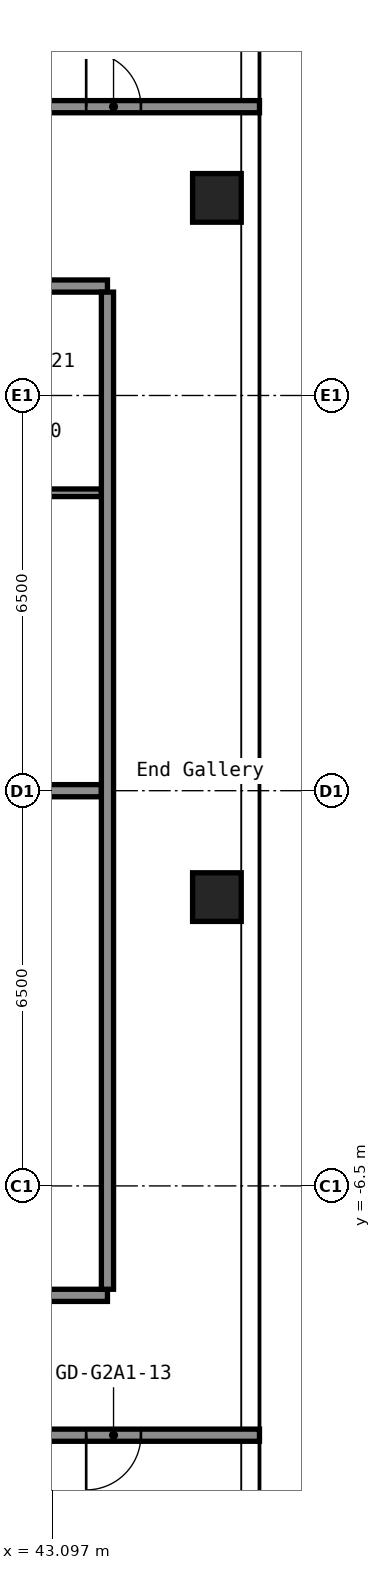
"""IFC4 building model, lengths in metres.
Left out: names, types, materials, properties, quantities, classifications, styles, units other than length and angle.
Written with IfcOpenShell. Run it as: python <this file> out.ifc"""

import sys

from ifc_helpers import new_model, si_unit, direction, frame, frame_2d, origin, origin_2d, place, context, subcontext, project, spatial, rectangle, hollow_rectangle, extrude, element, fill, save


model = new_model("IFC4")
c1 = context("Model", 3, precision=1e-05, world=origin(), true_north=direction((0.0, 1.0)))
c2 = subcontext(c1, "Body", "Model", "MODEL_VIEW")
j1 = project(units=[si_unit("LENGTHUNIT", "METRE"), si_unit("PLANEANGLEUNIT", "RADIAN")], contexts=[c1])
p1 = place(None, origin())
s1 = spatial("IfcSite", under=j1, at=p1, CompositionType="ELEMENT")
p2 = place(p1, origin())
s2 = spatial("IfcBuilding", under=s1, at=p2, CompositionType="ELEMENT")
p3 = place(p2, frame((0.0, 0.0, 91.4)))
s3 = spatial("IfcBuildingStorey", under=s2, at=p3, CompositionType="ELEMENT", Elevation=91.4)
for number, where, z_axis, x_axis in (
    (1, (45.8, -1.75, 0.0), (0.0, 0.0, 1.0), (1.0, 0.0, 0.0)),
    (2, (45.8, 9.75, 0.0), (0.0, 0.0, 1.0), (1.0, 0.0, 0.0)),
):
    element("IfcColumn", number, at=place(p3, frame(where, z_axis=z_axis, x_axis=x_axis)), inside=s3, PredefinedType="COLUMN", context=c2, shape_type="SweptSolid", body=[
        extrude(hollow_rectangle(XDim=0.8, YDim=0.8, WallThickness=0.032, at=origin_2d()), origin(), (0.0, 0.0, 1.0), 2.8),
    ])
p4 = place(p3, frame((16.8, -10.6, 0.0), z_axis=(0.0, 0.0, 1.0), x_axis=(1.0, 0.0, 0.0)))
e3 = element("IfcWall", 3, at=p4, inside=s3, PredefinedType="PARTITIONING", context=c2, shape_type="SweptSolid", body=[
    extrude(rectangle(XDim=29.7, YDim=0.2, at=frame_2d((14.85, 0.0))), origin(), (0.0, 0.0, 1.0), 2.8),
])
p5 = place(p4, frame((1.06, 0.0, 0.0)))
e4 = element("IfcOpeningElement", 4, at=p5, cuts=e3, PredefinedType="OPENING", context=c2, shape_type="SweptSolid", body=[
    extrude(rectangle(XDim=0.9, YDim=2.1, at=frame_2d((0.45, 1.05))), frame((0.0, 0.11, 0.0), z_axis=(0.0, -1.0, 0.0), x_axis=(1.0, 0.0, 0.0)), (0.0, 0.0, 1.0), 0.22),
])
p6 = place(p4, frame((5.26, 0.0, 0.0)))
e5 = element("IfcOpeningElement", 5, at=p6, cuts=e3, PredefinedType="OPENING", context=c2, shape_type="SweptSolid", body=[
    extrude(rectangle(XDim=0.9, YDim=2.1, at=frame_2d((0.45, 1.05))), frame((0.0, 0.11, 0.0), z_axis=(0.0, -1.0, 0.0), x_axis=(1.0, 0.0, 0.0)), (0.0, 0.0, 1.0), 0.22),
])
p7 = place(p4, frame((9.63, 0.0, 0.0)))
e6 = element("IfcOpeningElement", 6, at=p7, cuts=e3, PredefinedType="OPENING", context=c2, shape_type="SweptSolid", body=[
    extrude(rectangle(XDim=0.9, YDim=2.1, at=frame_2d((0.45, 1.05))), frame((0.0, 0.11, 0.0), z_axis=(0.0, -1.0, 0.0), x_axis=(1.0, 0.0, 0.0)), (0.0, 0.0, 1.0), 0.22),
])
p8 = place(p4, frame((13.83, 0.0, 0.0)))
e7 = element("IfcOpeningElement", 7, at=p8, cuts=e3, PredefinedType="OPENING", context=c2, shape_type="SweptSolid", body=[
    extrude(rectangle(XDim=0.9, YDim=2.1, at=frame_2d((0.45, 1.05))), frame((0.0, 0.11, 0.0), z_axis=(0.0, -1.0, 0.0), x_axis=(1.0, 0.0, 0.0)), (0.0, 0.0, 1.0), 0.22),
])
p9 = place(p4, frame((18.115, 0.0, 0.0)))
e8 = element("IfcOpeningElement", 8, at=p9, cuts=e3, PredefinedType="OPENING", context=c2, shape_type="SweptSolid", body=[
    extrude(rectangle(XDim=0.9, YDim=2.1, at=frame_2d((0.45, 1.05))), frame((0.0, 0.11, 0.0), z_axis=(0.0, -1.0, 0.0), x_axis=(1.0, 0.0, 0.0)), (0.0, 0.0, 1.0), 0.22),
])
p10 = place(p4, frame((22.315, 0.0, 0.0)))
e9 = element("IfcOpeningElement", 9, at=p10, cuts=e3, PredefinedType="OPENING", context=c2, shape_type="SweptSolid", body=[
    extrude(rectangle(XDim=0.9, YDim=2.1, at=frame_2d((0.45, 1.05))), frame((0.0, 0.11, 0.0), z_axis=(0.0, -1.0, 0.0), x_axis=(1.0, 0.0, 0.0)), (0.0, 0.0, 1.0), 0.22),
])
p11 = place(p4, frame((26.85, 0.0, 0.0)))
e10 = element("IfcOpeningElement", 10, at=p11, cuts=e3, PredefinedType="OPENING", context=c2, shape_type="SweptSolid", body=[
    extrude(rectangle(XDim=0.9, YDim=2.1, at=frame_2d((0.45, 1.05))), frame((0.0, 0.11, 0.0), z_axis=(0.0, -1.0, 0.0), x_axis=(1.0, 0.0, 0.0)), (0.0, 0.0, 1.0), 0.22),
])
p12 = place(p3, frame((33.6, -8.3, 0.0), z_axis=(0.0, 0.0, 1.0), x_axis=(1.0, 0.0, 0.0)))
e11 = element("IfcWall", 11, at=p12, inside=s3, PredefinedType="PARTITIONING", context=c2, shape_type="SweptSolid", body=[
    extrude(rectangle(XDim=10.4, YDim=0.2, at=frame_2d((5.2, 0.0))), origin(), (0.0, 0.0, 1.0), 2.8),
])
p13 = place(p12, frame((4.7, 0.0, 0.0)))
e12 = element("IfcOpeningElement", 12, at=p13, cuts=e11, PredefinedType="OPENING", context=c2, shape_type="SweptSolid", body=[
    extrude(rectangle(XDim=1.0, YDim=2.1, at=frame_2d((0.5, 1.05))), frame((0.0, 0.11, 0.0), z_axis=(0.0, -1.0, 0.0), x_axis=(1.0, 0.0, 0.0)), (0.0, 0.0, 1.0), 0.22),
])
p14 = place(p3, frame((33.6, 0.0, 0.0), z_axis=(0.0, 0.0, 1.0), x_axis=(1.0, 0.0, 0.0)))
e13 = element("IfcWall", 13, at=p14, inside=s3, PredefinedType="PARTITIONING", context=c2, shape_type="SweptSolid", body=[
    extrude(rectangle(XDim=10.3, YDim=0.2, at=frame_2d((5.15, 0.0))), origin(), (0.0, 0.0, 1.0), 2.8),
])
p15 = place(p3, frame((40.663, 4.9, 0.0), z_axis=(0.0, 0.0, 1.0), x_axis=(1.0, 0.0, 0.0)))
e14 = element("IfcWall", 14, at=p15, inside=s3, PredefinedType="PARTITIONING", context=c2, shape_type="SweptSolid", body=[
    extrude(rectangle(XDim=3.237, YDim=0.125, at=frame_2d((1.619, 0.0))), origin(), (0.0, 0.0, 1.0), 2.8),
])
p16 = place(p15, frame((1.238, 0.0, 0.0)))
e15 = element("IfcOpeningElement", 15, at=p16, cuts=e14, PredefinedType="OPENING", context=c2, shape_type="SweptSolid", body=[
    extrude(rectangle(XDim=0.8, YDim=2.1, at=frame_2d((0.4, 1.05))), frame((0.0, 0.073, 0.0), z_axis=(0.0, -1.0, 0.0), x_axis=(1.0, 0.0, 0.0)), (0.0, 0.0, 1.0), 0.145),
])
p17 = place(p3, frame((33.6, 8.3, 0.0), z_axis=(0.0, 0.0, 1.0), x_axis=(1.0, 0.0, 0.0)))
e16 = element("IfcWall", 16, at=p17, inside=s3, PredefinedType="PARTITIONING", context=c2, shape_type="SweptSolid", body=[
    extrude(rectangle(XDim=10.4, YDim=0.2, at=frame_2d((5.2, 0.0))), origin(), (0.0, 0.0, 1.0), 2.8),
])
p18 = place(p17, frame((3.05, 0.0, 0.0)))
e17 = element("IfcOpeningElement", 17, at=p18, cuts=e16, PredefinedType="OPENING", context=c2, shape_type="SweptSolid", body=[
    extrude(rectangle(XDim=1.0, YDim=2.1, at=frame_2d((0.5, 1.05))), frame((0.0, 0.11, 0.0), z_axis=(0.0, -1.0, 0.0), x_axis=(1.0, 0.0, 0.0)), (0.0, 0.0, 1.0), 0.22),
])
p19 = place(p3, frame((16.8, 11.25, 0.0), z_axis=(0.0, 0.0, 1.0), x_axis=(1.0, 0.0, 0.0)))
e18 = element("IfcWall", 18, at=p19, inside=s3, PredefinedType="PARTITIONING", context=c2, shape_type="SweptSolid", body=[
    extrude(rectangle(XDim=29.7, YDim=0.2, at=frame_2d((14.85, 0.0))), origin(), (0.0, 0.0, 1.0), 2.8),
])
p20 = place(p19, frame((2.0, 0.0, 0.0)))
e19 = element("IfcOpeningElement", 19, at=p20, cuts=e18, PredefinedType="OPENING", context=c2, shape_type="SweptSolid", body=[
    extrude(rectangle(XDim=1.0, YDim=2.1, at=frame_2d((0.5, 1.05))), frame((0.0, 0.11, 0.0), z_axis=(0.0, -1.0, 0.0), x_axis=(1.0, 0.0, 0.0)), (0.0, 0.0, 1.0), 0.22),
])
p21 = place(p19, frame((10.4, 0.0, 0.0)))
e20 = element("IfcOpeningElement", 20, at=p21, cuts=e18, PredefinedType="OPENING", context=c2, shape_type="SweptSolid", body=[
    extrude(rectangle(XDim=1.0, YDim=2.1, at=frame_2d((0.5, 1.05))), frame((0.0, 0.11, 0.0), z_axis=(0.0, -1.0, 0.0), x_axis=(1.0, 0.0, 0.0)), (0.0, 0.0, 1.0), 0.22),
])
p22 = place(p19, frame((18.8, 0.0, 0.0)))
e21 = element("IfcOpeningElement", 21, at=p22, cuts=e18, PredefinedType="OPENING", context=c2, shape_type="SweptSolid", body=[
    extrude(rectangle(XDim=1.0, YDim=2.1, at=frame_2d((0.5, 1.05))), frame((0.0, 0.11, 0.0), z_axis=(0.0, -1.0, 0.0), x_axis=(1.0, 0.0, 0.0)), (0.0, 0.0, 1.0), 0.22),
])
p23 = place(p19, frame((26.85, 0.0, 0.0)))
e22 = element("IfcOpeningElement", 22, at=p23, cuts=e18, PredefinedType="OPENING", context=c2, shape_type="SweptSolid", body=[
    extrude(rectangle(XDim=0.9, YDim=2.1, at=frame_2d((0.45, 1.05))), frame((0.0, 0.11, 0.0), z_axis=(0.0, -1.0, 0.0), x_axis=(1.0, 0.0, 0.0)), (0.0, 0.0, 1.0), 0.22),
])
p24 = place(p3, frame((44.0, -8.2, 0.0), z_axis=(0.0, 0.0, 1.0), x_axis=(0.0, 1.0, 0.0)))
e23 = element("IfcWall", 23, at=p24, inside=s3, PredefinedType="PARTITIONING", context=c2, shape_type="SweptSolid", body=[
    extrude(rectangle(XDim=16.4, YDim=0.2, at=frame_2d((8.2, 0.0))), origin(), (0.0, 0.0, 1.0), 2.8),
])
p25 = place(p11, origin())
e24 = element("IfcDoor", 24, at=p25, inside=s3, OperationType="SINGLE_SWING_LEFT", PredefinedType="DOOR", context=c2, shape_type="SweptSolid", body=[
    extrude(rectangle(XDim=0.9, YDim=2.1, at=frame_2d((0.45, 1.05))), frame((0.0, 0.025, 0.0), z_axis=(0.0, -1.0, 0.0), x_axis=(1.0, 0.0, 0.0)), (0.0, 0.0, 1.0), 0.05),
])
fill(e10, e24)
p26 = place(p23, origin())
e25 = element("IfcDoor", 25, at=p26, inside=s3, OperationType="SINGLE_SWING_RIGHT", PredefinedType="DOOR", context=c2, shape_type="SweptSolid", body=[
    extrude(rectangle(XDim=0.9, YDim=2.1, at=frame_2d((0.45, 1.05))), frame((0.0, 0.025, 0.0), z_axis=(0.0, -1.0, 0.0), x_axis=(1.0, 0.0, 0.0)), (0.0, 0.0, 1.0), 0.05),
])
fill(e22, e25)
save(model, sys.argv[1])
